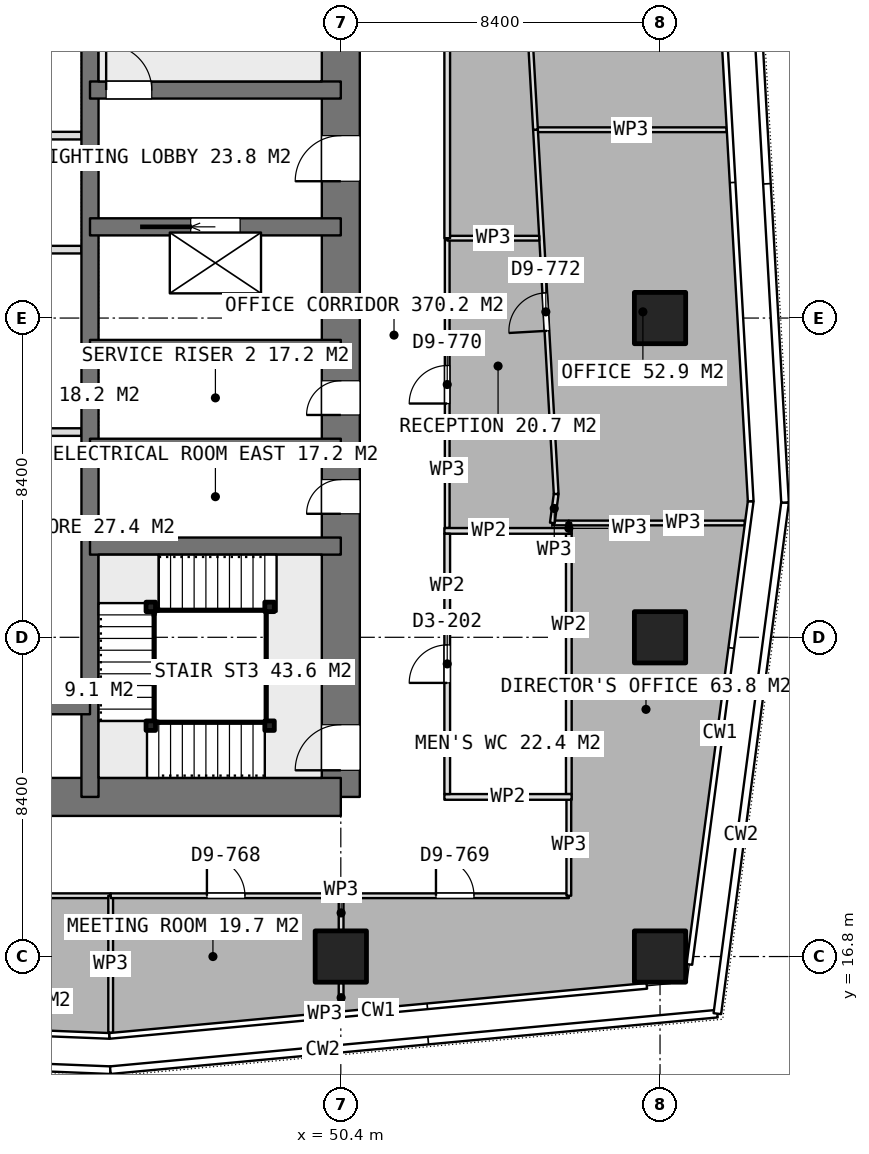
"""IFC4 building model, lengths in metres.
Left out: names, types, materials, properties, quantities, classifications, styles, units other than length and angle.
Written with IfcOpenShell. Run it as: python <this file> out.ifc"""

import sys

from ifc_helpers import new_model, si_unit, direction, frame, frame_2d, origin, origin_2d, place, context, subcontext, project, spatial, rectangle, extrude, element, fill, save


model = new_model("IFC4")
c1 = context("Model", 3, precision=1e-05, world=origin(), true_north=direction((0.0, 1.0)))
c2 = subcontext(c1, "Body", "Model", "MODEL_VIEW")
j1 = project(units=[si_unit("LENGTHUNIT", "METRE"), si_unit("PLANEANGLEUNIT", "RADIAN")], contexts=[c1])
p1 = place(None, origin())
s1 = spatial("IfcSite", under=j1, at=p1, CompositionType="ELEMENT")
p2 = place(p1, origin())
s2 = spatial("IfcBuilding", under=s1, at=p2, CompositionType="ELEMENT")
p3 = place(p2, frame((0.0, 0.0, 191.45)))
s3 = spatial("IfcBuildingStorey", under=s2, at=p3, CompositionType="ELEMENT", Elevation=191.45)
p4 = place(p3, frame((40.0, 21.0, 0.0), z_axis=(0.0, 0.0, 1.0), x_axis=(1.0, 0.0, 0.0)))
e1 = element("IfcWall", 1, at=p4, inside=s3, PredefinedType="SHEAR", context=c2, shape_type="SweptSolid", body=[
    extrude(rectangle(XDim=10.4, YDim=1.0, at=frame_2d((5.2, 0.0))), origin(), (0.0, 0.0, 1.0), 3.75),
])
p5 = place(p3, frame((50.4, 21.0, 0.0), z_axis=(0.0, 0.0, 1.0), x_axis=(0.0, 1.0, 0.0)))
e2 = element("IfcWall", 2, at=p5, inside=s3, PredefinedType="SHEAR", context=c2, shape_type="SweptSolid", body=[
    extrude(rectangle(XDim=25.2, YDim=1.0, at=frame_2d((12.6, 0.0))), origin(), (0.0, 0.0, 1.0), 3.75),
])
p6 = place(p5, frame((16.2, 0.0, 0.0)))
e3 = element("IfcOpeningElement", 3, at=p6, cuts=e2, PredefinedType="OPENING", context=c2, shape_type="SweptSolid", body=[
    extrude(rectangle(XDim=1.2, YDim=2.1, at=frame_2d((0.6, 1.05))), frame((0.0, 0.51, 0.0), z_axis=(0.0, -1.0, 0.0), x_axis=(1.0, 0.0, 0.0)), (0.0, 0.0, 1.0), 1.02),
])
p7 = place(p5, frame((10.05, 0.0, 0.0)))
e4 = element("IfcOpeningElement", 4, at=p7, cuts=e2, PredefinedType="OPENING", context=c2, shape_type="SweptSolid", body=[
    extrude(rectangle(XDim=0.9, YDim=2.1, at=frame_2d((0.45, 1.05))), frame((0.0, 0.51, 0.0), z_axis=(0.0, -1.0, 0.0), x_axis=(1.0, 0.0, 0.0)), (0.0, 0.0, 1.0), 1.02),
])
p8 = place(p5, frame((7.45, 0.0, 0.0)))
e5 = element("IfcOpeningElement", 5, at=p8, cuts=e2, PredefinedType="OPENING", context=c2, shape_type="SweptSolid", body=[
    extrude(rectangle(XDim=0.9, YDim=2.1, at=frame_2d((0.45, 1.05))), frame((0.0, 0.51, 0.0), z_axis=(0.0, -1.0, 0.0), x_axis=(1.0, 0.0, 0.0)), (0.0, 0.0, 1.0), 1.02),
])
p9 = place(p5, frame((0.7, 0.0, 0.0)))
e6 = element("IfcOpeningElement", 6, at=p9, cuts=e2, PredefinedType="OPENING", context=c2, shape_type="SweptSolid", body=[
    extrude(rectangle(XDim=1.2, YDim=2.1, at=frame_2d((0.6, 1.05))), frame((0.0, 0.51, 0.0), z_axis=(0.0, -1.0, 0.0), x_axis=(1.0, 0.0, 0.0)), (0.0, 0.0, 1.0), 1.02),
])
p10 = place(p3, frame((43.8, 21.0, 0.0), z_axis=(0.0, 0.0, 1.0), x_axis=(0.0, 1.0, 0.0)))
e7 = element("IfcWall", 7, at=p10, inside=s3, PredefinedType="SHEAR", context=c2, shape_type="SweptSolid", body=[
    extrude(rectangle(XDim=25.2, YDim=0.45, at=frame_2d((12.6, 0.0))), origin(), (0.0, 0.0, 1.0), 3.75),
])
p11 = place(p3, frame((40.0, 23.4, 0.0), z_axis=(0.0, 0.0, 1.0), x_axis=(1.0, 0.0, 0.0)))
e8 = element("IfcWall", 8, at=p11, inside=s3, PredefinedType="SHEAR", context=c2, shape_type="SweptSolid", body=[
    extrude(rectangle(XDim=3.8, YDim=0.45, at=frame_2d((1.9, 0.0))), origin(), (0.0, 0.0, 1.0), 3.75),
])
for number, where, z_axis, x_axis in (
    (9, (43.8, 27.6, 0.0), (0.0, 0.0, 1.0), (1.0, 0.0, 0.0)),
    (10, (43.8, 30.2, 0.0), (0.0, 0.0, 1.0), (1.0, 0.0, 0.0)),
    (11, (43.8, 32.8, 0.0), (0.0, 0.0, 1.0), (1.0, 0.0, 0.0)),
):
    element("IfcWall", number, at=place(p3, frame(where, z_axis=z_axis, x_axis=x_axis)), inside=s3, PredefinedType="SHEAR", context=c2, shape_type="SweptSolid", body=[
        extrude(rectangle(XDim=6.6, YDim=0.45, at=frame_2d((3.3, 0.0))), origin(), (0.0, 0.0, 1.0), 3.75),
    ])
p12 = place(p3, frame((43.8, 36.0, 0.0), z_axis=(0.0, 0.0, 1.0), x_axis=(1.0, 0.0, 0.0)))
e12 = element("IfcWall", 12, at=p12, inside=s3, PredefinedType="SHEAR", context=c2, shape_type="SweptSolid", body=[
    extrude(rectangle(XDim=6.6, YDim=0.45, at=frame_2d((3.3, 0.0))), origin(), (0.0, 0.0, 1.0), 3.75),
])
p13 = place(p12, frame((2.65, 0.0, 0.0)))
e13 = element("IfcOpeningElement", 13, at=p13, cuts=e12, PredefinedType="OPENING", context=c2, shape_type="SweptSolid", body=[
    extrude(rectangle(XDim=1.3, YDim=2.1, at=frame_2d((0.65, 1.05))), frame((0.0, 0.235, 0.0), z_axis=(0.0, -1.0, 0.0), x_axis=(1.0, 0.0, 0.0)), (0.0, 0.0, 1.0), 0.47),
])
p14 = place(p3, frame((43.8, 39.6, 0.0), z_axis=(0.0, 0.0, 1.0), x_axis=(1.0, 0.0, 0.0)))
e14 = element("IfcWall", 14, at=p14, inside=s3, PredefinedType="SHEAR", context=c2, shape_type="SweptSolid", body=[
    extrude(rectangle(XDim=6.6, YDim=0.45, at=frame_2d((3.3, 0.0))), origin(), (0.0, 0.0, 1.0), 3.75),
])
p15 = place(p14, frame((0.425, 0.0, 0.0)))
e15 = element("IfcOpeningElement", 15, at=p15, cuts=e14, PredefinedType="OPENING", context=c2, shape_type="SweptSolid", body=[
    extrude(rectangle(XDim=1.2, YDim=2.1, at=frame_2d((0.6, 1.05))), frame((0.0, 0.235, 0.0), z_axis=(0.0, -1.0, 0.0), x_axis=(1.0, 0.0, 0.0)), (0.0, 0.0, 1.0), 0.47),
])
for number, where, z_axis, x_axis in (
    (16, (50.4, 16.8, 0.0), (0.0, 0.0, 1.0), (1.0, 0.0, 0.0)),
    (17, (58.8, 16.8, 0.0), (0.0, 0.0, 1.0), (1.0, 0.0, 0.0)),
    (18, (58.8, 25.2, 0.0), (0.0, 0.0, 1.0), (1.0, 0.0, 0.0)),
    (19, (58.8, 33.6, 0.0), (0.0, 0.0, 1.0), (1.0, 0.0, 0.0)),
):
    element("IfcColumn", number, at=place(p3, frame(where, z_axis=z_axis, x_axis=x_axis)), inside=s3, PredefinedType="COLUMN", context=c2, shape_type="SweptSolid", body=[
        extrude(rectangle(XDim=1.35, YDim=1.35, at=origin_2d()), origin(), (0.0, 0.0, 1.0), 3.75),
    ])
for number, where, z_axis, x_axis in (
    (20, (40.225, 35.4, 0.0), (0.0, 0.0, 1.0), (1.0, 0.0, 0.0)),
    (21, (40.225, 38.4, 0.0), (0.0, 0.0, 1.0), (1.0, 0.0, 0.0)),
    (22, (40.225, 30.6, 0.0), (0.0, 0.0, 1.0), (1.0, 0.0, 0.0)),
):
    element("IfcWall", number, at=place(p3, frame(where, z_axis=z_axis, x_axis=x_axis)), inside=s3, PredefinedType="PARTITIONING", context=c2, shape_type="SweptSolid", body=[
        extrude(rectangle(XDim=3.35, YDim=0.2, at=frame_2d((1.675, 0.0))), origin(), (0.0, 0.0, 1.0), 3.5),
    ])
for number, where, z_axis, x_axis in (
    (23, (53.125, 21.0, 0.0), (0.0, 0.0, 1.0), (1.0, 0.0, 0.0)),
    (24, (53.125, 28.0, 0.0), (0.0, 0.0, 1.0), (1.0, 0.0, 0.0)),
):
    element("IfcWall", number, at=place(p3, frame(where, z_axis=z_axis, x_axis=x_axis)), inside=s3, PredefinedType="PARTITIONING", context=c2, shape_type="SweptSolid", body=[
        extrude(rectangle(XDim=3.35, YDim=0.15, at=frame_2d((1.675, 0.0))), origin(), (0.0, 0.0, 1.0), 3.5),
    ])
p16 = place(p3, frame((53.2, 21.075, 0.0), z_axis=(0.0, 0.0, 1.0), x_axis=(0.0, 1.0, 0.0)))
e25 = element("IfcWall", 25, at=p16, inside=s3, PredefinedType="PARTITIONING", context=c2, shape_type="SweptSolid", body=[
    extrude(rectangle(XDim=6.85, YDim=0.15, at=frame_2d((3.425, 0.0))), origin(), (0.0, 0.0, 1.0), 3.5),
])
p17 = place(p16, frame((2.925, 0.0, 0.0)))
e26 = element("IfcOpeningElement", 26, at=p17, cuts=e25, PredefinedType="OPENING", context=c2, shape_type="SweptSolid", body=[
    extrude(rectangle(XDim=1.0, YDim=2.1, at=frame_2d((0.5, 1.05))), frame((0.0, 0.085, 0.0), z_axis=(0.0, -1.0, 0.0), x_axis=(1.0, 0.0, 0.0)), (0.0, 0.0, 1.0), 0.17),
])
p18 = place(p3, frame((56.4, 21.075, 0.0), z_axis=(0.0, 0.0, 1.0), x_axis=(0.0, 1.0, 0.0)))
e27 = element("IfcWall", 27, at=p18, inside=s3, PredefinedType="PARTITIONING", context=c2, shape_type="SweptSolid", body=[
    extrude(rectangle(XDim=6.85, YDim=0.15, at=frame_2d((3.425, 0.0))), origin(), (0.0, 0.0, 1.0), 3.5),
])
p19 = place(p3, frame((35.199, 18.4, 0.0), z_axis=(0.0, 0.0, 1.0), x_axis=(1.0, 0.0, 0.0)))
e28 = element("IfcWall", 28, at=p19, inside=s3, PredefinedType="PARTITIONING", context=c2, shape_type="SweptSolid", body=[
    extrude(rectangle(XDim=9.145, YDim=0.125, at=frame_2d((4.573, 0.0))), origin(), (0.0, 0.0, 1.0), 3.5),
])
p20 = place(p19, frame((4.073, 0.0, 0.0)))
e29 = element("IfcOpeningElement", 29, at=p20, cuts=e28, PredefinedType="OPENING", context=c2, shape_type="SweptSolid", body=[
    extrude(rectangle(XDim=1.0, YDim=2.1, at=frame_2d((0.5, 1.05))), frame((0.0, 0.073, 0.0), z_axis=(0.0, -1.0, 0.0), x_axis=(1.0, 0.0, 0.0)), (0.0, 0.0, 1.0), 0.145),
])
p21 = place(p3, frame((44.344, 18.4, 0.0), z_axis=(0.0, 0.0, 1.0), x_axis=(0.0, -1.0, 0.0)))
e30 = element("IfcWall", 30, at=p21, inside=s3, PredefinedType="PARTITIONING", context=c2, shape_type="SweptSolid", body=[
    extrude(rectangle(XDim=3.605, YDim=0.125, at=frame_2d((1.802, 0.0))), origin(), (0.0, 0.0, 1.0), 3.5),
])
p22 = place(p3, frame((44.345, 18.4, 0.0), z_axis=(0.0, 0.0, 1.0), x_axis=(1.0, 0.0, 0.0)))
e31 = element("IfcWall", 31, at=p22, inside=s3, PredefinedType="PARTITIONING", context=c2, shape_type="SweptSolid", body=[
    extrude(rectangle(XDim=6.063, YDim=0.125, at=frame_2d((3.031, 0.0))), origin(), (0.0, 0.0, 1.0), 3.5),
])
p23 = place(p22, frame((2.532, 0.0, 0.0)))
e32 = element("IfcOpeningElement", 32, at=p23, cuts=e31, PredefinedType="OPENING", context=c2, shape_type="SweptSolid", body=[
    extrude(rectangle(XDim=1.0, YDim=2.1, at=frame_2d((0.5, 1.05))), frame((0.0, 0.073, 0.0), z_axis=(0.0, -1.0, 0.0), x_axis=(1.0, 0.0, 0.0)), (0.0, 0.0, 1.0), 0.145),
])
p24 = place(p3, frame((50.408, 18.4, 0.0), z_axis=(0.0, 0.0, 1.0), x_axis=(0.0, -1.0, 0.0)))
e33 = element("IfcWall", 33, at=p24, inside=s3, PredefinedType="PARTITIONING", context=c2, shape_type="SweptSolid", body=[
    extrude(rectangle(XDim=0.905, YDim=0.125, at=frame_2d((0.452, 0.0))), origin(), (0.0, 0.0, 1.0), 3.5),
])
p25 = place(p3, frame((50.408, 16.105, 0.0), z_axis=(0.0, 0.0, 1.0), x_axis=(0.0, -1.0, 0.0)))
e34 = element("IfcWall", 34, at=p25, inside=s3, PredefinedType="PARTITIONING", context=c2, shape_type="SweptSolid", body=[
    extrude(rectangle(XDim=0.775, YDim=0.125, at=frame_2d((0.387, 0.0))), origin(), (0.0, 0.0, 1.0), 3.5),
])
p26 = place(p3, frame((50.409, 18.4, 0.0), z_axis=(0.0, 0.0, 1.0), x_axis=(1.0, 0.0, 0.0)))
e35 = element("IfcWall", 35, at=p26, inside=s3, PredefinedType="PARTITIONING", context=c2, shape_type="SweptSolid", body=[
    extrude(rectangle(XDim=5.991, YDim=0.125, at=frame_2d((2.996, 0.0))), origin(), (0.0, 0.0, 1.0), 3.5),
])
p27 = place(p26, frame((2.495, 0.0, 0.0)))
e36 = element("IfcOpeningElement", 36, at=p27, cuts=e35, PredefinedType="OPENING", context=c2, shape_type="SweptSolid", body=[
    extrude(rectangle(XDim=1.0, YDim=2.1, at=frame_2d((0.5, 1.05))), frame((0.0, 0.073, 0.0), z_axis=(0.0, -1.0, 0.0), x_axis=(1.0, 0.0, 0.0)), (0.0, 0.0, 1.0), 0.145),
])
p28 = place(p3, frame((56.4, 18.4, 0.0), z_axis=(0.0, 0.0, 1.0), x_axis=(0.0, 1.0, 0.0)))
e37 = element("IfcWall", 37, at=p28, inside=s3, PredefinedType="PARTITIONING", context=c2, shape_type="SweptSolid", body=[
    extrude(rectangle(XDim=2.675, YDim=0.125, at=frame_2d((1.337, 0.0))), origin(), (0.0, 0.0, 1.0), 3.5),
])
p29 = place(p3, frame((56.4, 27.925, 0.0), z_axis=(0.0, 0.0, 1.0), x_axis=(0.0, 1.0, 0.0)))
e38 = element("IfcWall", 38, at=p29, inside=s3, PredefinedType="PARTITIONING", context=c2, shape_type="SweptSolid", body=[
    extrude(rectangle(XDim=0.283, YDim=0.125, at=frame_2d((0.142, 0.0))), origin(), (0.0, 0.0, 1.0), 3.5),
])
p30 = place(p3, frame((56.4, 28.208, 0.0), z_axis=(0.0, 0.0, 1.0), x_axis=(1.0, 0.0, 0.0)))
e39 = element("IfcWall", 39, at=p30, inside=s3, PredefinedType="PARTITIONING", context=c2, shape_type="SweptSolid", body=[
    extrude(rectangle(XDim=4.63, YDim=0.125, at=frame_2d((2.315, 0.0))), origin(), (0.0, 0.0, 1.0), 3.5),
])
p31 = place(p3, frame((55.523, 38.555, 0.0), z_axis=(0.0, 0.0, 1.0), x_axis=(1.0, 0.0, 0.0)))
e40 = element("IfcWall", 40, at=p31, inside=s3, PredefinedType="PARTITIONING", context=c2, shape_type="SweptSolid", body=[
    extrude(rectangle(XDim=5.028, YDim=0.125, at=frame_2d((2.514, 0.0))), origin(), (0.0, 0.0, 1.0), 3.5),
])
p32 = place(p3, frame((56.4, 28.209, 0.0), z_axis=(0.0, 0.0, 1.0), x_axis=(-1.0, 0.0, 0.0)))
e41 = element("IfcWall", 41, at=p32, inside=s3, PredefinedType="PARTITIONING", context=c2, shape_type="SweptSolid", body=[
    extrude(rectangle(XDim=0.434, YDim=0.125, at=frame_2d((0.217, 0.0))), origin(), (0.0, 0.0, 1.0), 3.5),
])
p33 = place(p3, frame((55.966, 28.209, 0.0), z_axis=(0.0, 0.0, 1.0), x_axis=(0.131020731706, 0.991379628529, 0.0)))
e42 = element("IfcWall", 42, at=p33, inside=s3, PredefinedType="PARTITIONING", context=c2, shape_type="SweptSolid", body=[
    extrude(rectangle(XDim=0.77, YDim=0.125, at=frame_2d((0.385, 0.0))), origin(), (0.0, 0.0, 1.0), 3.5),
])
p34 = place(p3, frame((56.067, 28.972, 0.0), z_axis=(0.0, 0.0, 1.0), x_axis=(-0.056670220537, 0.99839295175, 0.0)))
e43 = element("IfcWall", 43, at=p34, inside=s3, PredefinedType="PARTITIONING", context=c2, shape_type="SweptSolid", body=[
    extrude(rectangle(XDim=9.598, YDim=0.125, at=frame_2d((4.799, 0.0))), origin(), (0.0, 0.0, 1.0), 3.5),
])
p35 = place(p34, frame((4.299, 0.0, 0.0)))
e44 = element("IfcOpeningElement", 44, at=p35, cuts=e43, PredefinedType="OPENING", context=c2, shape_type="SweptSolid", body=[
    extrude(rectangle(XDim=1.0, YDim=2.1, at=frame_2d((0.5, 1.05))), frame((0.0, 0.073, 0.0), z_axis=(0.0, -1.0, 0.0), x_axis=(1.0, 0.0, 0.0)), (0.0, 0.0, 1.0), 0.145),
])
p36 = place(p3, frame((55.523, 38.556, 0.0), z_axis=(0.0, 0.0, 1.0), x_axis=(-0.056678391694, 0.99839248791, 0.0)))
e45 = element("IfcWall", 45, at=p36, inside=s3, PredefinedType="PARTITIONING", context=c2, shape_type="SweptSolid", body=[
    extrude(rectangle(XDim=9.791, YDim=0.125, at=frame_2d((4.896, 0.0))), origin(), (0.0, 0.0, 1.0), 3.5),
])
p37 = place(p36, frame((4.395, 0.0, 0.0)))
e46 = element("IfcOpeningElement", 46, at=p37, cuts=e45, PredefinedType="OPENING", context=c2, shape_type="SweptSolid", body=[
    extrude(rectangle(XDim=1.0, YDim=2.1, at=frame_2d((0.5, 1.05))), frame((0.0, 0.073, 0.0), z_axis=(0.0, -1.0, 0.0), x_axis=(1.0, 0.0, 0.0)), (0.0, 0.0, 1.0), 0.145),
])
p38 = place(p3, frame((53.2, 28.075, 0.0), z_axis=(0.0, 0.0, 1.0), x_axis=(0.0, 1.0, 0.0)))
e47 = element("IfcWall", 47, at=p38, inside=s3, PredefinedType="PARTITIONING", context=c2, shape_type="SweptSolid", body=[
    extrude(rectangle(XDim=7.626, YDim=0.125, at=frame_2d((3.813, 0.0))), origin(), (0.0, 0.0, 1.0), 3.5),
])
p39 = place(p38, frame((3.276, 0.0, 0.0)))
e48 = element("IfcOpeningElement", 48, at=p39, cuts=e47, PredefinedType="OPENING", context=c2, shape_type="SweptSolid", body=[
    extrude(rectangle(XDim=1.0, YDim=2.1, at=frame_2d((0.5, 1.05))), frame((0.0, 0.073, 0.0), z_axis=(0.0, -1.0, 0.0), x_axis=(1.0, 0.0, 0.0)), (0.0, 0.0, 1.0), 0.145),
])
p40 = place(p3, frame((53.2, 35.701, 0.0), z_axis=(0.0, 0.0, 1.0), x_axis=(1.0, 0.0, 0.0)))
e49 = element("IfcWall", 49, at=p40, inside=s3, PredefinedType="PARTITIONING", context=c2, shape_type="SweptSolid", body=[
    extrude(rectangle(XDim=2.422, YDim=0.125, at=frame_2d((1.211, 0.0))), origin(), (0.0, 0.0, 1.0), 3.5),
])
p41 = place(p3, frame((53.2, 35.701, 0.0), z_axis=(0.0, 0.0, 1.0), x_axis=(0.0, 1.0, 0.0)))
e50 = element("IfcWall", 50, at=p41, inside=s3, PredefinedType="PARTITIONING", context=c2, shape_type="SweptSolid", body=[
    extrude(rectangle(XDim=16.874, YDim=0.15, at=frame_2d((8.437, 0.0))), origin(), (0.0, 0.0, 1.0), 3.5),
])
p42 = place(p41, frame((8.337, 0.0, 0.0)))
e51 = element("IfcOpeningElement", 51, at=p42, cuts=e50, PredefinedType="OPENING", context=c2, shape_type="SweptSolid", body=[
    extrude(rectangle(XDim=1.0, YDim=2.1, at=frame_2d((0.5, 1.05))), frame((0.0, 0.085, 0.0), z_axis=(0.0, -1.0, 0.0), x_axis=(1.0, 0.0, 0.0)), (0.0, 0.0, 1.0), 0.17),
])
for number, where, z_axis, x_axis in (
    (52, (48.525, 22.875, 0.0), (0.0, 0.0, 1.0), (1.0, 0.0, 0.0)),
    (53, (45.4, 22.875, 0.0), (0.0, 0.0, 1.0), (1.0, 0.0, 0.0)),
    (54, (45.4, 26.0, 0.0), (0.0, 0.0, 1.0), (1.0, 0.0, 0.0)),
    (55, (48.525, 26.0, 0.0), (0.0, 0.0, 1.0), (1.0, 0.0, 0.0)),
):
    element("IfcColumn", number, at=place(p3, frame(where, z_axis=z_axis, x_axis=x_axis)), inside=s3, PredefinedType="COLUMN", context=c2, shape_type="SweptSolid", body=[
        extrude(rectangle(XDim=0.25, YDim=0.25, at=origin_2d()), origin(), (0.0, 0.0, 1.0), 3.75),
    ])
p43 = place(p6, origin())
e56 = element("IfcDoor", 56, at=p43, inside=s3, OperationType="SINGLE_SWING_LEFT", PredefinedType="DOOR", context=c2, shape_type="SweptSolid", body=[
    extrude(rectangle(XDim=1.2, YDim=2.1, at=frame_2d((0.6, 1.05))), frame((0.0, 0.025, 0.0), z_axis=(0.0, -1.0, 0.0), x_axis=(1.0, 0.0, 0.0)), (0.0, 0.0, 1.0), 0.05),
])
fill(e3, e56)
p44 = place(p7, origin())
e57 = element("IfcDoor", 57, at=p44, inside=s3, OperationType="SINGLE_SWING_LEFT", PredefinedType="DOOR", context=c2, shape_type="SweptSolid", body=[
    extrude(rectangle(XDim=0.9, YDim=2.1, at=frame_2d((0.45, 1.05))), frame((0.0, 0.025, 0.0), z_axis=(0.0, -1.0, 0.0), x_axis=(1.0, 0.0, 0.0)), (0.0, 0.0, 1.0), 0.05),
])
fill(e4, e57)
p45 = place(p8, origin())
e58 = element("IfcDoor", 58, at=p45, inside=s3, OperationType="SINGLE_SWING_LEFT", PredefinedType="DOOR", context=c2, shape_type="SweptSolid", body=[
    extrude(rectangle(XDim=0.9, YDim=2.1, at=frame_2d((0.45, 1.05))), frame((0.0, 0.025, 0.0), z_axis=(0.0, -1.0, 0.0), x_axis=(1.0, 0.0, 0.0)), (0.0, 0.0, 1.0), 0.05),
])
fill(e5, e58)
p46 = place(p13, origin())
e59 = element("IfcDoor", 59, at=p46, inside=s3, OperationType="SLIDING_TO_LEFT", PredefinedType="USERDEFINED", context=c2, shape_type="SweptSolid", body=[
    extrude(rectangle(XDim=1.3, YDim=2.1, at=frame_2d((0.65, 1.05))), frame((0.0, 0.025, 0.0), z_axis=(0.0, -1.0, 0.0), x_axis=(1.0, 0.0, 0.0)), (0.0, 0.0, 1.0), 0.05),
])
fill(e13, e59)
p47 = place(p17, origin())
e60 = element("IfcDoor", 60, at=p47, inside=s3, OperationType="SINGLE_SWING_LEFT", PredefinedType="DOOR", context=c2, shape_type="SweptSolid", body=[
    extrude(rectangle(XDim=1.0, YDim=2.1, at=frame_2d((0.5, 1.05))), frame((0.0, 0.025, 0.0), z_axis=(0.0, -1.0, 0.0), x_axis=(1.0, 0.0, 0.0)), (0.0, 0.0, 1.0), 0.05),
])
fill(e26, e60)
p48 = place(p23, origin())
e61 = element("IfcDoor", 61, at=p48, inside=s3, OperationType="SINGLE_SWING_LEFT", PredefinedType="DOOR", context=c2, shape_type="SweptSolid", body=[
    extrude(rectangle(XDim=1.0, YDim=2.1, at=frame_2d((0.5, 1.05))), frame((0.0, 0.025, 0.0), z_axis=(0.0, -1.0, 0.0), x_axis=(1.0, 0.0, 0.0)), (0.0, 0.0, 1.0), 0.05),
])
fill(e32, e61)
p49 = place(p27, origin())
e62 = element("IfcDoor", 62, at=p49, inside=s3, OperationType="SINGLE_SWING_LEFT", PredefinedType="DOOR", context=c2, shape_type="SweptSolid", body=[
    extrude(rectangle(XDim=1.0, YDim=2.1, at=frame_2d((0.5, 1.05))), frame((0.0, 0.025, 0.0), z_axis=(0.0, -1.0, 0.0), x_axis=(1.0, 0.0, 0.0)), (0.0, 0.0, 1.0), 0.05),
])
fill(e36, e62)
p50 = place(p39, origin())
e63 = element("IfcDoor", 63, at=p50, inside=s3, OperationType="SINGLE_SWING_LEFT", PredefinedType="DOOR", context=c2, shape_type="SweptSolid", body=[
    extrude(rectangle(XDim=1.0, YDim=2.1, at=frame_2d((0.5, 1.05))), frame((0.0, 0.025, 0.0), z_axis=(0.0, -1.0, 0.0), x_axis=(1.0, 0.0, 0.0)), (0.0, 0.0, 1.0), 0.05),
])
fill(e48, e63)
p51 = place(p35, origin())
e64 = element("IfcDoor", 64, at=p51, inside=s3, OperationType="SINGLE_SWING_LEFT", PredefinedType="DOOR", context=c2, shape_type="SweptSolid", body=[
    extrude(rectangle(XDim=1.0, YDim=2.1, at=frame_2d((0.5, 1.05))), frame((0.0, 0.025, 0.0), z_axis=(0.0, -1.0, 0.0), x_axis=(1.0, 0.0, 0.0)), (0.0, 0.0, 1.0), 0.05),
])
fill(e44, e64)
p52 = place(p15, origin())
e65 = element("IfcDoor", 65, at=p52, inside=s3, OperationType="SINGLE_SWING_RIGHT", PredefinedType="DOOR", context=c2, shape_type="SweptSolid", body=[
    extrude(rectangle(XDim=1.2, YDim=2.1, at=frame_2d((0.6, 1.05))), frame((0.0, 0.025, 0.0), z_axis=(0.0, -1.0, 0.0), x_axis=(1.0, 0.0, 0.0)), (0.0, 0.0, 1.0), 0.05),
])
fill(e15, e65)
p53 = place(p9, origin())
e66 = element("IfcDoor", 66, at=p53, inside=s3, OperationType="SINGLE_SWING_RIGHT", PredefinedType="DOOR", context=c2, shape_type="SweptSolid", body=[
    extrude(rectangle(XDim=1.2, YDim=2.1, at=frame_2d((0.6, 1.05))), frame((0.0, 0.025, 0.0), z_axis=(0.0, -1.0, 0.0), x_axis=(1.0, 0.0, 0.0)), (0.0, 0.0, 1.0), 0.05),
])
fill(e6, e66)
save(model, sys.argv[1])
